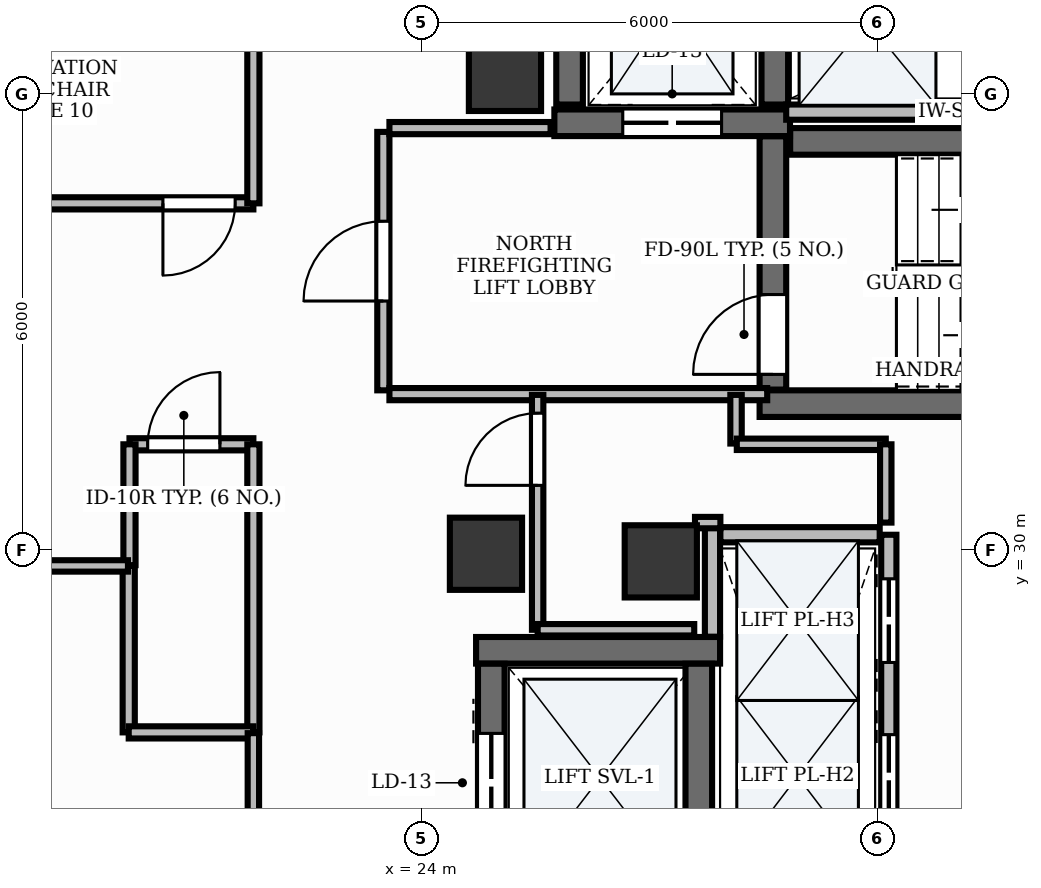
"""IFC4 building model, lengths in metres.
Left out: names, types, materials, properties, quantities, classifications, styles, units other than length and angle.
Written with IfcOpenShell. Run it as: python <this file> out.ifc"""

import sys

from ifc_helpers import new_model, si_unit, direction, frame, frame_2d, origin, origin_2d, place, context, subcontext, project, spatial, rectangle, extrude, element, fill, save


model = new_model("IFC4")
c1 = context("Model", 3, precision=1e-05, world=origin(), true_north=direction((0.0, 1.0)))
c2 = subcontext(c1, "Body", "Model", "MODEL_VIEW")
j1 = project(units=[si_unit("LENGTHUNIT", "METRE"), si_unit("PLANEANGLEUNIT", "RADIAN")], contexts=[c1])
p1 = place(None, origin())
s1 = spatial("IfcSite", under=j1, at=p1, CompositionType="ELEMENT")
p2 = place(p1, origin())
s2 = spatial("IfcBuilding", under=s1, at=p2, CompositionType="ELEMENT")
p3 = place(p2, frame((0.0, 0.0, 314.4)))
s3 = spatial("IfcBuildingStorey", under=s2, at=p3, CompositionType="ELEMENT", Elevation=314.4)
p4 = place(p3, frame((28.852, 35.375, 0.0), z_axis=(0.0, 0.0, 1.0), x_axis=(1.0, 0.0, 0.0)))
e1 = element("IfcWall", 1, at=p4, inside=s3, PredefinedType="SHEAR", context=c2, shape_type="SweptSolid", body=[
    extrude(rectangle(XDim=8.148, YDim=0.35, at=frame_2d((4.074, 0.0))), origin(), (0.0, 0.0, 1.0), 3.9),
])
p5 = place(p3, frame((28.45, 31.925, 0.0), z_axis=(0.0, 0.0, 1.0), x_axis=(1.0, 0.0, 0.0)))
e2 = element("IfcWall", 2, at=p5, inside=s3, PredefinedType="SHEAR", context=c2, shape_type="SweptSolid", body=[
    extrude(rectangle(XDim=8.55, YDim=0.35, at=frame_2d((4.275, 0.0))), origin(), (0.0, 0.0, 1.0), 3.9),
])
p6 = place(p3, frame((28.625, 32.11, 0.0), z_axis=(0.0, 0.0, 1.0), x_axis=(0.0, 1.0, 0.0)))
e3 = element("IfcWall", 3, at=p6, inside=s3, PredefinedType="SHEAR", context=c2, shape_type="SweptSolid", body=[
    extrude(rectangle(XDim=3.333, YDim=0.35, at=frame_2d((1.667, 0.0))), origin(), (0.0, 0.0, 1.0), 3.9),
])
p7 = place(p6, frame((0.2, 0.0, 0.0)))
e4 = element("IfcOpeningElement", 4, at=p7, cuts=e3, PredefinedType="OPENING", context=c2, shape_type="SweptSolid", body=[
    extrude(rectangle(XDim=1.05, YDim=2.15, at=frame_2d((0.525, 1.075))), frame((0.0, 0.19, 0.0), z_axis=(0.0, -1.0, 0.0), x_axis=(1.0, 0.0, 0.0)), (0.0, 0.0, 1.0), 0.38),
])
p8 = place(p3, frame((25.75, 35.62, 0.0), z_axis=(0.0, 0.0, 1.0), x_axis=(1.0, 0.0, 0.0)))
e5 = element("IfcWall", 5, at=p8, inside=s3, PredefinedType="SHEAR", context=c2, shape_type="SweptSolid", body=[
    extrude(rectangle(XDim=3.1, YDim=0.35, at=frame_2d((1.55, 0.0))), origin(), (0.0, 0.0, 1.0), 3.9),
])
p9 = place(p8, frame((0.9, 0.0, 0.0)))
e6 = element("IfcOpeningElement", 6, at=p9, cuts=e5, PredefinedType="OPENING", context=c2, shape_type="SweptSolid", body=[
    extrude(rectangle(XDim=1.3, YDim=2.2, at=frame_2d((0.65, 1.1))), frame((0.0, 0.19, 0.0), z_axis=(0.0, -1.0, 0.0), x_axis=(1.0, 0.0, 0.0)), (0.0, 0.0, 1.0), 0.38),
])
for number, where, z_axis, x_axis in (
    (7, (25.95, 35.86, 0.0), (0.0, 0.0, 1.0), (0.0, 1.0, 0.0)),
    (8, (28.65, 35.86, 0.0), (0.0, 0.0, 1.0), (0.0, 1.0, 0.0)),
):
    element("IfcWall", number, at=place(p3, frame(where, z_axis=z_axis, x_axis=x_axis)), inside=s3, PredefinedType="SHEAR", context=c2, shape_type="SweptSolid", body=[
        extrude(rectangle(XDim=2.7, YDim=0.35, at=frame_2d((1.35, 0.0))), origin(), (0.0, 0.0, 1.0), 3.9),
    ])
p10 = place(p3, frame((24.72, 28.68, 0.0), z_axis=(0.0, 0.0, 1.0), x_axis=(1.0, 0.0, 0.0)))
e9 = element("IfcWall", 9, at=p10, inside=s3, PredefinedType="SHEAR", context=c2, shape_type="SweptSolid", body=[
    extrude(rectangle(XDim=3.21, YDim=0.35, at=frame_2d((1.605, 0.0))), origin(), (0.0, 0.0, 1.0), 3.9),
])
p11 = place(p3, frame((24.92, 25.497, 0.0), z_axis=(0.0, 0.0, 1.0), x_axis=(0.0, 1.0, 0.0)))
e10 = element("IfcWall", 10, at=p11, inside=s3, PredefinedType="SHEAR", context=c2, shape_type="SweptSolid", body=[
    extrude(rectangle(XDim=3.006, YDim=0.35, at=frame_2d((1.503, 0.0))), origin(), (0.0, 0.0, 1.0), 3.9),
])
p12 = place(p11, frame((0.79, 0.0, 0.0)))
e11 = element("IfcOpeningElement", 11, at=p12, cuts=e10, PredefinedType="OPENING", context=c2, shape_type="SweptSolid", body=[
    extrude(rectangle(XDim=1.3, YDim=2.2, at=frame_2d((0.65, 1.1))), frame((0.0, 0.19, 0.0), z_axis=(0.0, -1.0, 0.0), x_axis=(1.0, 0.0, 0.0)), (0.0, 0.0, 1.0), 0.38),
])
p13 = place(p3, frame((27.65, 25.497, 0.0), z_axis=(0.0, 0.0, 1.0), x_axis=(0.0, 1.0, 0.0)))
e12 = element("IfcWall", 12, at=p13, inside=s3, PredefinedType="SHEAR", context=c2, shape_type="SweptSolid", body=[
    extrude(rectangle(XDim=3.006, YDim=0.35, at=frame_2d((1.503, 0.0))), origin(), (0.0, 0.0, 1.0), 3.9),
])
for number, where, z_axis, x_axis in (
    (13, (25.1, 36.25, -0.0), (0.0, 0.0, 1.0), (1.0, 0.0, 0.0)),
    (14, (24.85, 29.95, -0.0), (0.0, 0.0, 1.0), (1.0, 0.0, 0.0)),
    (15, (27.15, 29.85, -0.0), (0.0, 0.0, 1.0), (1.0, 0.0, 0.0)),
):
    element("IfcColumn", number, at=place(p3, frame(where, z_axis=z_axis, x_axis=x_axis)), inside=s3, PredefinedType="PILASTER", context=c2, shape_type="SweptSolid", body=[
        extrude(rectangle(XDim=0.95, YDim=0.95, at=origin_2d()), origin(), (0.0, 0.0, 1.0), 3.901),
    ])
p14 = place(p3, frame((27.83, 28.859, 0.0), z_axis=(0.0, 0.0, 1.0), x_axis=(0.0, 1.0, 0.0)))
e16 = element("IfcWall", 16, at=p14, inside=s3, PredefinedType="PARTITIONING", context=c2, shape_type="SweptSolid", body=[
    extrude(rectangle(XDim=1.441, YDim=0.2, at=frame_2d((0.721, 0.0))), origin(), (0.0, 0.0, 1.0), 2.22),
])
p15 = place(p3, frame((30.15, 23.85, 0.0), z_axis=(0.0, 0.0, 1.0), x_axis=(0.0, 1.0, 0.0)))
e17 = element("IfcWall", 17, at=p15, inside=s3, PredefinedType="PARTITIONING", context=c2, shape_type="SweptSolid", body=[
    extrude(rectangle(XDim=6.35, YDim=0.2, at=frame_2d((3.175, 0.0))), origin(), (0.0, 0.0, 1.0), 2.22),
])
p16 = place(p15, frame((0.58, 0.0, 0.0)))
e18 = element("IfcOpeningElement", 18, at=p16, cuts=e17, PredefinedType="OPENING", context=c2, shape_type="SweptSolid", body=[
    extrude(rectangle(XDim=1.1, YDim=2.2, at=frame_2d((0.55, 1.1))), frame((0.0, 0.115, 0.0), z_axis=(0.0, -1.0, 0.0), x_axis=(1.0, 0.0, 0.0)), (0.0, 0.0, 1.0), 0.23),
])
p17 = place(p15, frame((2.62, 0.0, 0.0)))
e19 = element("IfcOpeningElement", 19, at=p17, cuts=e17, PredefinedType="OPENING", context=c2, shape_type="SweptSolid", body=[
    extrude(rectangle(XDim=1.1, YDim=2.2, at=frame_2d((0.55, 1.1))), frame((0.0, 0.115, 0.0), z_axis=(0.0, -1.0, 0.0), x_axis=(1.0, 0.0, 0.0)), (0.0, 0.0, 1.0), 0.23),
])
p18 = place(p15, frame((4.67, 0.0, 0.0)))
e20 = element("IfcOpeningElement", 20, at=p18, cuts=e17, PredefinedType="OPENING", context=c2, shape_type="SweptSolid", body=[
    extrude(rectangle(XDim=1.1, YDim=2.2, at=frame_2d((0.55, 1.1))), frame((0.0, 0.115, 0.0), z_axis=(0.0, -1.0, 0.0), x_axis=(1.0, 0.0, 0.0)), (0.0, 0.0, 1.0), 0.23),
])
p19 = place(p3, frame((27.934, 30.2, 0.0), z_axis=(0.0, 0.0, 1.0), x_axis=(1.0, 0.0, 0.0)))
e21 = element("IfcWall", 21, at=p19, inside=s3, PredefinedType="PARTITIONING", context=c2, shape_type="SweptSolid", body=[
    extrude(rectangle(XDim=2.096, YDim=0.2, at=frame_2d((1.048, 0.0))), origin(), (0.0, 0.0, 1.0), 2.22),
])
p20 = place(p3, frame((28.8, 35.76, 0.0), z_axis=(0.0, 0.0, 1.0), x_axis=(1.0, 0.0, 0.0)))
e22 = element("IfcWall", 22, at=p20, inside=s3, PredefinedType="PARTITIONING", context=c2, shape_type="SweptSolid", body=[
    extrude(rectangle(XDim=4.57, YDim=0.2, at=frame_2d((2.285, 0.0))), origin(), (0.0, 0.0, 1.0), 2.22),
])
p21 = place(p3, frame((23.5, 32.1, 0.0), z_axis=(0.0, 0.0, 1.0), x_axis=(0.0, 1.0, 0.0)))
e23 = element("IfcWall", 23, at=p21, inside=s3, PredefinedType="PARTITIONING", context=c2, shape_type="SweptSolid", body=[
    extrude(rectangle(XDim=3.4, YDim=0.16, at=frame_2d((1.7, 0.0))), origin(), (0.0, 0.0, 1.0), 2.22),
])
p22 = place(p21, frame((1.175, 0.0, 0.0)))
e24 = element("IfcOpeningElement", 24, at=p22, cuts=e23, PredefinedType="OPENING", context=c2, shape_type="SweptSolid", body=[
    extrude(rectangle(XDim=1.05, YDim=2.15, at=frame_2d((0.525, 1.075))), frame((0.0, 0.095, 0.0), z_axis=(0.0, -1.0, 0.0), x_axis=(1.0, 0.0, 0.0)), (0.0, 0.0, 1.0), 0.19),
])
p23 = place(p3, frame((23.58, 32.05, 0.0), z_axis=(0.0, 0.0, 1.0), x_axis=(1.0, 0.0, 0.0)))
e25 = element("IfcWall", 25, at=p23, inside=s3, PredefinedType="PARTITIONING", context=c2, shape_type="SweptSolid", body=[
    extrude(rectangle(XDim=4.97, YDim=0.16, at=frame_2d((2.485, 0.0))), origin(), (0.0, 0.0, 1.0), 2.22),
])
p24 = place(p3, frame((23.58, 35.55, 0.0), z_axis=(0.0, 0.0, 1.0), x_axis=(1.0, 0.0, 0.0)))
e26 = element("IfcWall", 26, at=p24, inside=s3, PredefinedType="PARTITIONING", context=c2, shape_type="SweptSolid", body=[
    extrude(rectangle(XDim=2.12, YDim=0.16, at=frame_2d((1.06, 0.0))), origin(), (0.0, 0.0, 1.0), 2.22),
])
p25 = place(p3, frame((20.16, 31.39, 0.0), z_axis=(0.0, 0.0, 1.0), x_axis=(1.0, 0.0, 0.0)))
e27 = element("IfcWall", 27, at=p25, inside=s3, PredefinedType="PARTITIONING", context=c2, shape_type="SweptSolid", body=[
    extrude(rectangle(XDim=1.63, YDim=0.16, at=frame_2d((0.815, 0.0))), origin(), (0.0, 0.0, 1.0), 2.22),
])
p26 = place(p25, frame((0.24, 0.0, 0.0)))
e28 = element("IfcOpeningElement", 28, at=p26, cuts=e27, PredefinedType="OPENING", context=c2, shape_type="SweptSolid", body=[
    extrude(rectangle(XDim=0.95, YDim=2.15, at=frame_2d((0.475, 1.075))), frame((0.0, 0.095, 0.0), z_axis=(0.0, -1.0, 0.0), x_axis=(1.0, 0.0, 0.0)), (0.0, 0.0, 1.0), 0.19),
])
p27 = place(p3, frame((21.79, 34.56, 0.0), z_axis=(0.0, 0.0, 1.0), x_axis=(-1.0, 0.0, 0.0)))
e29 = element("IfcWall", 29, at=p27, inside=s3, PredefinedType="PARTITIONING", context=c2, shape_type="SweptSolid", body=[
    extrude(rectangle(XDim=3.99, YDim=0.16, at=frame_2d((1.995, 0.0))), origin(), (0.0, 0.0, 1.0), 2.22),
])
p28 = place(p27, frame((0.24, 0.0, 0.0)))
e30 = element("IfcOpeningElement", 30, at=p28, cuts=e29, PredefinedType="OPENING", context=c2, shape_type="SweptSolid", body=[
    extrude(rectangle(XDim=0.95, YDim=2.15, at=frame_2d((0.475, 1.075))), frame((0.0, 0.095, 0.0), z_axis=(0.0, -1.0, 0.0), x_axis=(1.0, 0.0, 0.0)), (0.0, 0.0, 1.0), 0.19),
])
p29 = place(p3, frame((25.53, 28.95, 0.0), z_axis=(0.0, 0.0, 1.0), x_axis=(0.0, 1.0, 0.0)))
e31 = element("IfcWall", 31, at=p29, inside=s3, PredefinedType="PARTITIONING", context=c2, shape_type="SweptSolid", body=[
    extrude(rectangle(XDim=3.09, YDim=0.15, at=frame_2d((1.545, 0.0))), origin(), (0.0, 0.0, 1.0), 2.22),
])
p30 = place(p29, frame((1.9, 0.0, 0.0)))
e32 = element("IfcOpeningElement", 32, at=p30, cuts=e31, PredefinedType="OPENING", context=c2, shape_type="SweptSolid", body=[
    extrude(rectangle(XDim=0.95, YDim=2.15, at=frame_2d((0.475, 1.075))), frame((0.0, 0.09, 0.0), z_axis=(0.0, -1.0, 0.0), x_axis=(1.0, 0.0, 0.0)), (0.0, 0.0, 1.0), 0.18),
])
p31 = place(p3, frame((20.15, 27.6, 0.0), z_axis=(0.0, 0.0, 1.0), x_axis=(0.0, 1.0, 0.0)))
e33 = element("IfcWall", 33, at=p31, inside=s3, PredefinedType="PARTITIONING", context=c2, shape_type="SweptSolid", body=[
    extrude(rectangle(XDim=2.19, YDim=0.16, at=frame_2d((1.095, 0.0))), origin(), (0.0, 0.0, 1.0), 2.22),
])
p32 = place(p3, frame((20.16, 29.8, 0.0), z_axis=(0.0, 0.0, 1.0), x_axis=(0.0, 1.0, 0.0)))
e34 = element("IfcWall", 34, at=p32, inside=s3, PredefinedType="PARTITIONING", context=c2, shape_type="SweptSolid", body=[
    extrude(rectangle(XDim=1.59, YDim=0.16, at=frame_2d((0.795, 0.0))), origin(), (0.0, 0.0, 1.0), 2.22),
])
p33 = place(p3, frame((21.79, 31.39, 0.0), z_axis=(0.0, 0.0, 1.0), x_axis=(0.0, -1.0, 0.0)))
e35 = element("IfcWall", 35, at=p33, inside=s3, PredefinedType="PARTITIONING", context=c2, shape_type="SweptSolid", body=[
    extrude(rectangle(XDim=3.79, YDim=0.16, at=frame_2d((1.895, 0.0))), origin(), (0.0, 0.0, 1.0), 2.22),
])
p34 = place(p3, frame((21.79, 27.6, 0.0), z_axis=(0.0, 0.0, 1.0), x_axis=(-1.0, 0.0, 0.0)))
e36 = element("IfcWall", 36, at=p34, inside=s3, PredefinedType="PARTITIONING", context=c2, shape_type="SweptSolid", body=[
    extrude(rectangle(XDim=1.64, YDim=0.16, at=frame_2d((0.82, 0.0))), origin(), (0.0, 0.0, 1.0), 2.22),
])
p35 = place(p3, frame((17.2, 29.79, 0.0), z_axis=(0.0, 0.0, 1.0), x_axis=(1.0, 0.0, 0.0)))
e37 = element("IfcWall", 37, at=p35, inside=s3, PredefinedType="PARTITIONING", context=c2, shape_type="SweptSolid", body=[
    extrude(rectangle(XDim=2.94, YDim=0.15, at=frame_2d((1.47, 0.0))), origin(), (0.0, 0.0, 1.0), 2.22),
])
p36 = place(p3, frame((21.79, 27.59, 0.0), z_axis=(0.0, 0.0, 1.0), x_axis=(0.0, -1.0, 0.0)))
e38 = element("IfcWall", 38, at=p36, inside=s3, PredefinedType="PARTITIONING", context=c2, shape_type="SweptSolid", body=[
    extrude(rectangle(XDim=3.38, YDim=0.15, at=frame_2d((1.69, 0.0))), origin(), (0.0, 0.0, 1.0), 2.22),
])
p37 = place(p3, frame((21.79, 40.75, 0.0), z_axis=(0.0, 0.0, 1.0), x_axis=(0.0, -1.0, 0.0)))
e39 = element("IfcWall", 39, at=p37, inside=s3, PredefinedType="PARTITIONING", context=c2, shape_type="SweptSolid", body=[
    extrude(rectangle(XDim=6.19, YDim=0.16, at=frame_2d((3.095, 0.0))), origin(), (0.0, 0.0, 1.0), 2.22),
])
p38 = place(p3, frame((28.14, 32.04, 0.0), z_axis=(0.0, 0.0, 1.0), x_axis=(0.0, -1.0, 0.0)))
e40 = element("IfcWall", 40, at=p38, inside=s3, PredefinedType="PARTITIONING", context=c2, shape_type="SweptSolid", body=[
    extrude(rectangle(XDim=0.64, YDim=0.15, at=frame_2d((0.32, 0.0))), origin(), (0.0, 0.0, 1.0), 2.22),
])
p39 = place(p3, frame((28.15, 31.39, 0.0), z_axis=(0.0, 0.0, 1.0), x_axis=(1.0, 0.0, 0.0)))
e41 = element("IfcWall", 41, at=p39, inside=s3, PredefinedType="PARTITIONING", context=c2, shape_type="SweptSolid", body=[
    extrude(rectangle(XDim=1.96, YDim=0.15, at=frame_2d((0.98, 0.0))), origin(), (0.0, 0.0, 1.0), 2.22),
])
p40 = place(p3, frame((30.11, 31.39, 0.0), z_axis=(0.0, 0.0, 1.0), x_axis=(0.0, -1.0, 0.0)))
e42 = element("IfcWall", 42, at=p40, inside=s3, PredefinedType="PARTITIONING", context=c2, shape_type="SweptSolid", body=[
    extrude(rectangle(XDim=1.03, YDim=0.15, at=frame_2d((0.515, 0.0))), origin(), (0.0, 0.0, 1.0), 2.22),
])
p41 = place(p3, frame((27.934, 30.36, 0.0), z_axis=(0.0, 0.0, 1.0), x_axis=(-1.0, 0.0, 0.0)))
e43 = element("IfcWall", 43, at=p41, inside=s3, PredefinedType="PARTITIONING", context=c2, shape_type="SweptSolid", body=[
    extrude(rectangle(XDim=0.334, YDim=0.15, at=frame_2d((0.167, 0.0))), origin(), (0.0, 0.0, 1.0), 2.22),
])
p42 = place(p3, frame((27.59, 28.95, 0.0), z_axis=(0.0, 0.0, 1.0), x_axis=(-1.0, 0.0, 0.0)))
e44 = element("IfcWall", 44, at=p42, inside=s3, PredefinedType="PARTITIONING", context=c2, shape_type="SweptSolid", body=[
    extrude(rectangle(XDim=2.06, YDim=0.15, at=frame_2d((1.03, 0.0))), origin(), (0.0, 0.0, 1.0), 2.22),
])
p43 = place(p7, origin())
e45 = element("IfcDoor", 45, at=p43, inside=s3, OperationType="SINGLE_SWING_LEFT", PredefinedType="DOOR", context=c2, shape_type="SweptSolid", body=[
    extrude(rectangle(XDim=1.05, YDim=2.15, at=frame_2d((0.525, 1.075))), frame((0.0, 0.025, 0.0), z_axis=(0.0, -1.0, 0.0), x_axis=(1.0, 0.0, 0.0)), (0.0, 0.0, 1.0), 0.05),
])
fill(e4, e45)
p44 = place(p17, origin())
e46 = element("IfcDoor", 46, at=p44, inside=s3, OperationType="DOUBLE_DOOR_SLIDING", PredefinedType="DOOR", context=c2, shape_type="SweptSolid", body=[
    extrude(rectangle(XDim=1.1, YDim=2.2, at=frame_2d((0.55, 1.1))), frame((0.0, 0.025, 0.0), z_axis=(0.0, -1.0, 0.0), x_axis=(1.0, 0.0, 0.0)), (0.0, 0.0, 1.0), 0.05),
])
fill(e19, e46)
p45 = place(p18, origin())
e47 = element("IfcDoor", 47, at=p45, inside=s3, OperationType="DOUBLE_DOOR_SLIDING", PredefinedType="DOOR", context=c2, shape_type="SweptSolid", body=[
    extrude(rectangle(XDim=1.1, YDim=2.2, at=frame_2d((0.55, 1.1))), frame((0.0, 0.025, 0.0), z_axis=(0.0, -1.0, 0.0), x_axis=(1.0, 0.0, 0.0)), (0.0, 0.0, 1.0), 0.05),
])
fill(e20, e47)
p46 = place(p9, origin())
e48 = element("IfcDoor", 48, at=p46, inside=s3, OperationType="DOUBLE_DOOR_SLIDING", PredefinedType="DOOR", context=c2, shape_type="SweptSolid", body=[
    extrude(rectangle(XDim=1.3, YDim=2.2, at=frame_2d((0.65, 1.1))), frame((0.0, 0.025, 0.0), z_axis=(0.0, -1.0, 0.0), x_axis=(1.0, 0.0, 0.0)), (0.0, 0.0, 1.0), 0.05),
])
fill(e6, e48)
p47 = place(p12, origin())
e49 = element("IfcDoor", 49, at=p47, inside=s3, OperationType="DOUBLE_DOOR_SLIDING", PredefinedType="DOOR", context=c2, shape_type="SweptSolid", body=[
    extrude(rectangle(XDim=1.3, YDim=2.2, at=frame_2d((0.65, 1.1))), frame((0.0, 0.025, 0.0), z_axis=(0.0, -1.0, 0.0), x_axis=(1.0, 0.0, 0.0)), (0.0, 0.0, 1.0), 0.05),
])
fill(e11, e49)
p48 = place(p22, origin())
e50 = element("IfcDoor", 50, at=p48, inside=s3, OperationType="SINGLE_SWING_LEFT", PredefinedType="DOOR", context=c2, shape_type="SweptSolid", body=[
    extrude(rectangle(XDim=1.05, YDim=2.15, at=frame_2d((0.525, 1.075))), frame((0.0, 0.025, 0.0), z_axis=(0.0, -1.0, 0.0), x_axis=(1.0, 0.0, 0.0)), (0.0, 0.0, 1.0), 0.05),
])
fill(e24, e50)
p49 = place(p26, origin())
e51 = element("IfcDoor", 51, at=p49, inside=s3, OperationType="SINGLE_SWING_RIGHT", PredefinedType="DOOR", context=c2, shape_type="SweptSolid", body=[
    extrude(rectangle(XDim=0.95, YDim=2.15, at=frame_2d((0.475, 1.075))), frame((0.0, 0.025, 0.0), z_axis=(0.0, -1.0, 0.0), x_axis=(1.0, 0.0, 0.0)), (0.0, 0.0, 1.0), 0.05),
])
fill(e28, e51)
p50 = place(p28, origin())
e52 = element("IfcDoor", 52, at=p50, inside=s3, OperationType="SINGLE_SWING_RIGHT", PredefinedType="DOOR", context=c2, shape_type="SweptSolid", body=[
    extrude(rectangle(XDim=0.95, YDim=2.15, at=frame_2d((0.475, 1.075))), frame((0.0, 0.025, 0.0), z_axis=(0.0, -1.0, 0.0), x_axis=(1.0, 0.0, 0.0)), (0.0, 0.0, 1.0), 0.05),
])
fill(e30, e52)
p51 = place(p30, origin())
e53 = element("IfcDoor", 53, at=p51, inside=s3, OperationType="SINGLE_SWING_LEFT", PredefinedType="DOOR", context=c2, shape_type="SweptSolid", body=[
    extrude(rectangle(XDim=0.95, YDim=2.15, at=frame_2d((0.475, 1.075))), frame((0.0, 0.025, 0.0), z_axis=(0.0, -1.0, 0.0), x_axis=(1.0, 0.0, 0.0)), (0.0, 0.0, 1.0), 0.05),
])
fill(e32, e53)
save(model, sys.argv[1])
